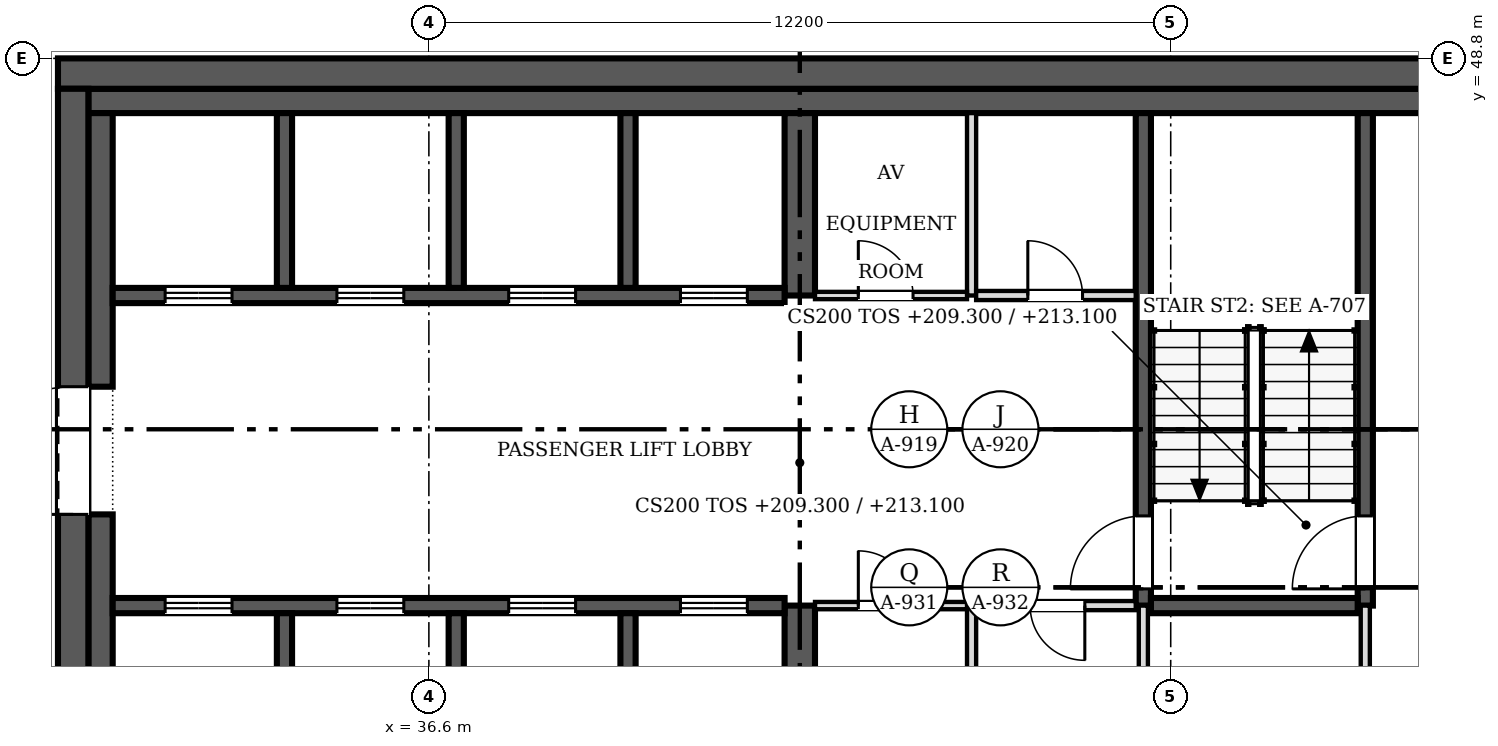
"""IFC4 building model, lengths in metres.
Left out: names, types, materials, properties, quantities, classifications, styles, units other than length and angle.
Written with IfcOpenShell. Run it as: python <this file> out.ifc"""

import sys

from ifc_helpers import new_model, si_unit, direction, frame, frame_2d, origin, place, context, subcontext, project, spatial, rectangle, extrude, source, transform, mapped, element, fill, save


model = new_model("IFC4")
c1 = context("Model", 3, precision=1e-05, world=origin(), true_north=direction((0.0, 1.0)))
c2 = subcontext(c1, "Body", "Model", "MODEL_VIEW")
j1 = project(units=[si_unit("LENGTHUNIT", "METRE"), si_unit("PLANEANGLEUNIT", "RADIAN")], contexts=[c1])
p1 = place(None, origin())
s1 = spatial("IfcSite", under=j1, at=p1, CompositionType="ELEMENT")
p2 = place(p1, origin())
s2 = spatial("IfcBuilding", under=s1, at=p2, CompositionType="ELEMENT")
p3 = place(p2, frame((0.0, 0.0, 209.3)))
s3 = spatial("IfcBuildingStorey", under=s2, at=p3, CompositionType="ELEMENT", Elevation=209.3)
p4 = place(p3, frame((30.75, 24.9, 0.0), z_axis=(0.0, 0.0, 1.0), x_axis=(0.0, 1.0, 0.0)))
e1 = element("IfcWall", 1, at=p4, inside=s3, PredefinedType="SHEAR", context=c2, shape_type="SweptSolid", body=[
    extrude(rectangle(XDim=23.4, YDim=0.5, at=frame_2d((11.7, 0.0))), origin(), (0.0, 0.0, 1.0), 3.8),
])
m1 = source(origin(), c2, "Body", "SweptSolid", [
    extrude(rectangle(XDim=2.1, YDim=2.4, at=frame_2d((1.05, 1.2))), frame((0.0, 0.26, 0.0), z_axis=(0.0, -1.0, 0.0), x_axis=(1.0, 0.0, 0.0)), (0.0, 0.0, 1.0), 0.52),
])
p5 = place(p4, frame((4.9, 0.0, 0.0)))
e2 = element("IfcOpeningElement", 2, at=p5, cuts=e1, PredefinedType="OPENING", context=c2, shape_type="MappedRepresentation", body=[
    mapped(m1, transform((0.0, 0.0, 0.0), scale=1.0)),
])
p6 = place(p4, frame((16.4, 0.0, 0.0)))
e3 = element("IfcOpeningElement", 3, at=p6, cuts=e1, PredefinedType="OPENING", context=c2, shape_type="MappedRepresentation", body=[
    mapped(m1, transform((0.0, 0.0, 0.0), scale=1.0)),
])
p7 = place(p3, frame((30.5, 48.55, 0.0), z_axis=(0.0, 0.0, 1.0), x_axis=(1.0, 0.0, 0.0)))
e4 = element("IfcWall", 4, at=p7, inside=s3, PredefinedType="SHEAR", context=c2, shape_type="SweptSolid", body=[
    extrude(rectangle(XDim=24.4, YDim=0.5, at=frame_2d((12.2, 0.0))), origin(), (0.0, 0.0, 1.0), 3.8),
])
p8 = place(p3, frame((31.0, 48.1, 0.0), z_axis=(0.0, 0.0, 1.0), x_axis=(1.0, 0.0, 0.0)))
e5 = element("IfcWall", 5, at=p8, inside=s3, PredefinedType="SOLIDWALL", context=c2, shape_type="SweptSolid", body=[
    extrude(rectangle(XDim=23.4, YDim=0.4, at=frame_2d((11.7, 0.0))), origin(), (0.0, 0.0, 1.0), 3.8),
])
p9 = place(p3, frame((31.2, 31.9, 0.0), z_axis=(0.0, 0.0, 1.0), x_axis=(0.0, 1.0, 0.0)))
e6 = element("IfcWall", 6, at=p9, inside=s3, PredefinedType="SOLIDWALL", context=c2, shape_type="SweptSolid", body=[
    extrude(rectangle(XDim=9.4, YDim=0.4, at=frame_2d((4.7, 0.0))), origin(), (0.0, 0.0, 1.0), 3.8),
])
p10 = place(p3, frame((31.2, 43.4, 0.0), z_axis=(0.0, 0.0, 1.0), x_axis=(0.0, 1.0, 0.0)))
e7 = element("IfcWall", 7, at=p10, inside=s3, PredefinedType="SOLIDWALL", context=c2, shape_type="SweptSolid", body=[
    extrude(rectangle(XDim=4.5, YDim=0.4, at=frame_2d((2.25, 0.0))), origin(), (0.0, 0.0, 1.0), 3.8),
])
p11 = place(p3, frame((42.7, 36.85, 0.0), z_axis=(0.0, 0.0, 1.0), x_axis=(0.0, 1.0, 0.0)))
e8 = element("IfcWall", 8, at=p11, inside=s3, PredefinedType="SHEAR", context=c2, shape_type="SweptSolid", body=[
    extrude(rectangle(XDim=2.95, YDim=0.5, at=frame_2d((1.475, 0.0))), origin(), (0.0, 0.0, 1.0), 3.8),
])
p12 = place(p3, frame((42.7, 44.9, 0.0), z_axis=(0.0, 0.0, 1.0), x_axis=(0.0, 1.0, 0.0)))
e9 = element("IfcWall", 9, at=p12, inside=s3, PredefinedType="SHEAR", context=c2, shape_type="SweptSolid", body=[
    extrude(rectangle(XDim=3.0, YDim=0.5, at=frame_2d((1.5, 0.0))), origin(), (0.0, 0.0, 1.0), 3.8),
])
p13 = place(p3, frame((31.4, 39.8, 0.0), z_axis=(0.0, 0.0, 1.0), x_axis=(1.0, 0.0, 0.0)))
e10 = element("IfcWall", 10, at=p13, inside=s3, PredefinedType="SOLIDWALL", context=c2, shape_type="SweptSolid", body=[
    extrude(rectangle(XDim=11.05, YDim=0.25, at=frame_2d((5.525, 0.0))), origin(), (0.0, 0.0, 1.0), 3.8),
])
m2 = source(origin(), c2, "Body", "SweptSolid", [
    extrude(rectangle(XDim=1.1, YDim=2.1, at=frame_2d((0.55, 1.05))), frame((0.0, 0.135, 0.0), z_axis=(0.0, -1.0, 0.0), x_axis=(1.0, 0.0, 0.0)), (0.0, 0.0, 1.0), 0.27),
])
p14 = place(p13, frame((0.863, 0.0, 0.0)))
e11 = element("IfcOpeningElement", 11, at=p14, cuts=e10, PredefinedType="OPENING", context=c2, shape_type="MappedRepresentation", body=[
    mapped(m2, transform((0.0, 0.0, 0.0), scale=1.0)),
])
p15 = place(p13, frame((3.688, 0.0, 0.0)))
e12 = element("IfcOpeningElement", 12, at=p15, cuts=e10, PredefinedType="OPENING", context=c2, shape_type="MappedRepresentation", body=[
    mapped(m2, transform((0.0, 0.0, 0.0), scale=1.0)),
])
p16 = place(p13, frame((6.512, 0.0, 0.0)))
e13 = element("IfcOpeningElement", 13, at=p16, cuts=e10, PredefinedType="OPENING", context=c2, shape_type="MappedRepresentation", body=[
    mapped(m2, transform((0.0, 0.0, 0.0), scale=1.0)),
])
p17 = place(p13, frame((9.337, 0.0, 0.0)))
e14 = element("IfcOpeningElement", 14, at=p17, cuts=e10, PredefinedType="OPENING", context=c2, shape_type="MappedRepresentation", body=[
    mapped(m2, transform((0.0, 0.0, 0.0), scale=1.0)),
])
p18 = place(p3, frame((42.45, 44.9, 0.0), z_axis=(0.0, 0.0, 1.0), x_axis=(-1.0, 0.0, 0.0)))
e15 = element("IfcWall", 15, at=p18, inside=s3, PredefinedType="SOLIDWALL", context=c2, shape_type="SweptSolid", body=[
    extrude(rectangle(XDim=11.05, YDim=0.25, at=frame_2d((5.525, 0.0))), origin(), (0.0, 0.0, 1.0), 3.8),
])
p19 = place(p18, frame((9.087, 0.0, 0.0)))
e16 = element("IfcOpeningElement", 16, at=p19, cuts=e15, PredefinedType="OPENING", context=c2, shape_type="MappedRepresentation", body=[
    mapped(m2, transform((0.0, 0.0, 0.0), scale=1.0)),
])
p20 = place(p18, frame((6.262, 0.0, 0.0)))
e17 = element("IfcOpeningElement", 17, at=p20, cuts=e15, PredefinedType="OPENING", context=c2, shape_type="MappedRepresentation", body=[
    mapped(m2, transform((0.0, 0.0, 0.0), scale=1.0)),
])
p21 = place(p18, frame((3.438, 0.0, 0.0)))
e18 = element("IfcOpeningElement", 18, at=p21, cuts=e15, PredefinedType="OPENING", context=c2, shape_type="MappedRepresentation", body=[
    mapped(m2, transform((0.0, 0.0, 0.0), scale=1.0)),
])
p22 = place(p18, frame((0.613, 0.0, 0.0)))
e19 = element("IfcOpeningElement", 19, at=p22, cuts=e15, PredefinedType="OPENING", context=c2, shape_type="MappedRepresentation", body=[
    mapped(m2, transform((0.0, 0.0, 0.0), scale=1.0)),
])
p23 = place(p3, frame((48.35, 47.9, 0.0), z_axis=(0.0, 0.0, 1.0), x_axis=(0.0, -1.0, 0.0)))
e20 = element("IfcWall", 20, at=p23, inside=s3, PredefinedType="SOLIDWALL", context=c2, shape_type="SweptSolid", body=[
    extrude(rectangle(XDim=8.1, YDim=0.25, at=frame_2d((4.05, 0.0))), origin(), (0.0, 0.0, 1.0), 3.8),
])
m3 = source(origin(), c2, "Body", "SweptSolid", [
    extrude(rectangle(XDim=1.2, YDim=2.1, at=frame_2d((0.6, 1.05))), frame((0.0, 0.135, 0.0), z_axis=(0.0, -1.0, 0.0), x_axis=(1.0, 0.0, 0.0)), (0.0, 0.0, 1.0), 0.27),
])
p24 = place(p23, frame((6.625, 0.0, 0.0)))
e21 = element("IfcOpeningElement", 21, at=p24, cuts=e20, PredefinedType="OPENING", context=c2, shape_type="MappedRepresentation", body=[
    mapped(m3, transform((0.0, 0.0, 0.0), scale=1.0)),
])
p25 = place(p3, frame((52.0, 39.8, 0.0), z_axis=(0.0, 0.0, 1.0), x_axis=(0.0, 1.0, 0.0)))
e22 = element("IfcWall", 22, at=p25, inside=s3, PredefinedType="SOLIDWALL", context=c2, shape_type="SweptSolid", body=[
    extrude(rectangle(XDim=8.1, YDim=0.25, at=frame_2d((4.05, 0.0))), origin(), (0.0, 0.0, 1.0), 3.8),
])
p26 = place(p25, frame((0.275, 0.0, 0.0)))
e23 = element("IfcOpeningElement", 23, at=p26, cuts=e22, PredefinedType="OPENING", context=c2, shape_type="MappedRepresentation", body=[
    mapped(m3, transform((0.0, 0.0, 0.0), scale=1.0)),
])
p27 = place(p3, frame((48.475, 39.8, 0.0), z_axis=(0.0, 0.0, 1.0), x_axis=(1.0, 0.0, 0.0)))
e24 = element("IfcWall", 24, at=p27, inside=s3, PredefinedType="SOLIDWALL", context=c2, shape_type="SweptSolid", body=[
    extrude(rectangle(XDim=3.4, YDim=0.25, at=frame_2d((1.7, 0.0))), origin(), (0.0, 0.0, 1.0), 3.8),
])
for number, where, z_axis, x_axis in (
    (25, (34.225, 36.85, 0.0), (0.0, 0.0, 1.0), (0.0, 1.0, 0.0)),
    (26, (37.05, 36.85, 0.0), (0.0, 0.0, 1.0), (0.0, 1.0, 0.0)),
    (27, (39.875, 36.85, 0.0), (0.0, 0.0, 1.0), (0.0, 1.0, 0.0)),
):
    element("IfcWall", number, at=place(p3, frame(where, z_axis=z_axis, x_axis=x_axis)), inside=s3, PredefinedType="SOLIDWALL", context=c2, shape_type="SweptSolid", body=[
        extrude(rectangle(XDim=2.825, YDim=0.25, at=frame_2d((1.413, 0.0))), origin(), (0.0, 0.0, 1.0), 3.8),
    ])
for number, where, z_axis, x_axis in (
    (28, (34.225, 45.025, 0.0), (0.0, 0.0, 1.0), (0.0, 1.0, 0.0)),
    (29, (37.05, 45.025, 0.0), (0.0, 0.0, 1.0), (0.0, 1.0, 0.0)),
    (30, (39.875, 45.025, 0.0), (0.0, 0.0, 1.0), (0.0, 1.0, 0.0)),
):
    element("IfcWall", number, at=place(p3, frame(where, z_axis=z_axis, x_axis=x_axis)), inside=s3, PredefinedType="SOLIDWALL", context=c2, shape_type="SweptSolid", body=[
        extrude(rectangle(XDim=2.875, YDim=0.25, at=frame_2d((1.438, 0.0))), origin(), (0.0, 0.0, 1.0), 3.8),
    ])
p28 = place(p3, frame((52.0, 33.525, 0.0), z_axis=(0.0, 0.0, 1.0), x_axis=(0.0, 1.0, 0.0)))
e31 = element("IfcWall", 31, at=p28, inside=s3, PredefinedType="PARTITIONING", context=c2, shape_type="SweptSolid", body=[
    extrude(rectangle(XDim=6.275, YDim=0.15, at=frame_2d((3.138, 0.0))), origin(), (0.0, 0.0, 1.0), 3.6),
])
m4 = source(origin(), c2, "Body", "SweptSolid", [
    extrude(rectangle(XDim=0.9, YDim=2.1, at=frame_2d((0.45, 1.05))), frame((0.0, 0.085, 0.0), z_axis=(0.0, -1.0, 0.0), x_axis=(1.0, 0.0, 0.0)), (0.0, 0.0, 1.0), 0.17),
])
p29 = place(p28, frame((1.025, 0.0, 0.0)))
e32 = element("IfcOpeningElement", 32, at=p29, cuts=e31, PredefinedType="OPENING", context=c2, shape_type="MappedRepresentation", body=[
    mapped(m4, transform((0.0, 0.0, 0.0), scale=1.0)),
])
for number, where, z_axis, x_axis in (
    (33, (45.525, 36.85, 0.0), (0.0, 0.0, 1.0), (0.0, 1.0, 0.0)),
    (34, (48.35, 36.85, 0.0), (0.0, 0.0, 1.0), (0.0, 1.0, 0.0)),
):
    element("IfcWall", number, at=place(p3, frame(where, z_axis=z_axis, x_axis=x_axis)), inside=s3, PredefinedType="PARTITIONING", context=c2, shape_type="SweptSolid", body=[
        extrude(rectangle(XDim=2.95, YDim=0.15, at=frame_2d((1.475, 0.0))), origin(), (0.0, 0.0, 1.0), 3.6),
    ])
p30 = place(p3, frame((45.525, 44.9, 0.0), z_axis=(0.0, 0.0, 1.0), x_axis=(0.0, 1.0, 0.0)))
e35 = element("IfcWall", 35, at=p30, inside=s3, PredefinedType="PARTITIONING", context=c2, shape_type="SweptSolid", body=[
    extrude(rectangle(XDim=3.0, YDim=0.15, at=frame_2d((1.5, 0.0))), origin(), (0.0, 0.0, 1.0), 3.6),
])
p31 = place(p3, frame((45.45, 39.8, 0.0), z_axis=(0.0, 0.0, 1.0), x_axis=(-1.0, 0.0, 0.0)))
e36 = element("IfcWall", 36, at=p31, inside=s3, PredefinedType="PARTITIONING", context=c2, shape_type="SweptSolid", body=[
    extrude(rectangle(XDim=2.5, YDim=0.12, at=frame_2d((1.25, 0.0))), origin(), (0.0, 0.0, 1.0), 3.6),
])
m5 = source(origin(), c2, "Body", "SweptSolid", [
    extrude(rectangle(XDim=0.9, YDim=2.1, at=frame_2d((0.45, 1.05))), frame((0.0, 0.07, 0.0), z_axis=(0.0, -1.0, 0.0), x_axis=(1.0, 0.0, 0.0)), (0.0, 0.0, 1.0), 0.14),
])
p32 = place(p31, frame((0.887, 0.0, 0.0)))
e37 = element("IfcOpeningElement", 37, at=p32, cuts=e36, PredefinedType="OPENING", context=c2, shape_type="MappedRepresentation", body=[
    mapped(m5, transform((0.0, 0.0, 0.0), scale=1.0)),
])
p33 = place(p3, frame((48.225, 39.8, 0.0), z_axis=(0.0, 0.0, 1.0), x_axis=(-1.0, 0.0, 0.0)))
e38 = element("IfcWall", 38, at=p33, inside=s3, PredefinedType="PARTITIONING", context=c2, shape_type="SweptSolid", body=[
    extrude(rectangle(XDim=2.625, YDim=0.15, at=frame_2d((1.312, 0.0))), origin(), (0.0, 0.0, 1.0), 3.6),
])
p34 = place(p33, frame((0.837, 0.0, 0.0)))
e39 = element("IfcOpeningElement", 39, at=p34, cuts=e38, PredefinedType="OPENING", context=c2, shape_type="MappedRepresentation", body=[
    mapped(m4, transform((0.0, 0.0, 0.0), scale=1.0)),
])
p35 = place(p3, frame((42.95, 44.9, 0.0), z_axis=(0.0, 0.0, 1.0), x_axis=(1.0, 0.0, 0.0)))
e40 = element("IfcWall", 40, at=p35, inside=s3, PredefinedType="PARTITIONING", context=c2, shape_type="SweptSolid", body=[
    extrude(rectangle(XDim=2.5, YDim=0.12, at=frame_2d((1.25, 0.0))), origin(), (0.0, 0.0, 1.0), 3.6),
])
p36 = place(p35, frame((0.712, 0.0, 0.0)))
e41 = element("IfcOpeningElement", 41, at=p36, cuts=e40, PredefinedType="OPENING", context=c2, shape_type="MappedRepresentation", body=[
    mapped(m5, transform((0.0, 0.0, 0.0), scale=1.0)),
])
p37 = place(p3, frame((45.6, 44.9, 0.0), z_axis=(0.0, 0.0, 1.0), x_axis=(1.0, 0.0, 0.0)))
e42 = element("IfcWall", 42, at=p37, inside=s3, PredefinedType="PARTITIONING", context=c2, shape_type="SweptSolid", body=[
    extrude(rectangle(XDim=2.625, YDim=0.15, at=frame_2d((1.312, 0.0))), origin(), (0.0, 0.0, 1.0), 3.6),
])
p38 = place(p37, frame((0.85, 0.0, 0.0)))
e43 = element("IfcOpeningElement", 43, at=p38, cuts=e42, PredefinedType="OPENING", context=c2, shape_type="MappedRepresentation", body=[
    mapped(m4, transform((0.0, 0.0, 0.0), scale=1.0)),
])
m6 = source(origin(), c2, "Body", "SweptSolid", [
    extrude(rectangle(XDim=2.1, YDim=2.4, at=frame_2d((1.05, 1.2))), frame((0.0, 0.025, 0.0), z_axis=(0.0, -1.0, 0.0), x_axis=(1.0, 0.0, 0.0)), (0.0, 0.0, 1.0), 0.05),
])
p39 = place(p6, origin())
e44 = element("IfcDoor", 44, at=p39, inside=s3, OperationType="DOUBLE_DOOR_SINGLE_SWING", PredefinedType="DOOR", context=c2, shape_type="MappedRepresentation", body=[
    mapped(m6, transform((0.0, 0.0, 0.0), scale=1.0)),
])
fill(e3, e44)
m7 = source(origin(), c2, "Body", "SweptSolid", [
    extrude(rectangle(XDim=1.1, YDim=2.1, at=frame_2d((0.55, 1.05))), frame((0.0, 0.025, 0.0), z_axis=(0.0, -1.0, 0.0), x_axis=(1.0, 0.0, 0.0)), (0.0, 0.0, 1.0), 0.05),
])
p40 = place(p14, origin())
e45 = element("IfcDoor", 45, at=p40, inside=s3, OperationType="DOUBLE_DOOR_SLIDING", PredefinedType="DOOR", context=c2, shape_type="MappedRepresentation", body=[
    mapped(m7, transform((0.0, 0.0, 0.0), scale=1.0)),
])
fill(e11, e45)
p41 = place(p15, origin())
e46 = element("IfcDoor", 46, at=p41, inside=s3, OperationType="DOUBLE_DOOR_SLIDING", PredefinedType="DOOR", context=c2, shape_type="MappedRepresentation", body=[
    mapped(m7, transform((0.0, 0.0, 0.0), scale=1.0)),
])
fill(e12, e46)
p42 = place(p16, origin())
e47 = element("IfcDoor", 47, at=p42, inside=s3, OperationType="DOUBLE_DOOR_SLIDING", PredefinedType="DOOR", context=c2, shape_type="MappedRepresentation", body=[
    mapped(m7, transform((0.0, 0.0, 0.0), scale=1.0)),
])
fill(e13, e47)
p43 = place(p17, origin())
e48 = element("IfcDoor", 48, at=p43, inside=s3, OperationType="DOUBLE_DOOR_SLIDING", PredefinedType="DOOR", context=c2, shape_type="MappedRepresentation", body=[
    mapped(m7, transform((0.0, 0.0, 0.0), scale=1.0)),
])
fill(e14, e48)
p44 = place(p19, origin())
e49 = element("IfcDoor", 49, at=p44, inside=s3, OperationType="DOUBLE_DOOR_SLIDING", PredefinedType="DOOR", context=c2, shape_type="MappedRepresentation", body=[
    mapped(m7, transform((0.0, 0.0, 0.0), scale=1.0)),
])
fill(e16, e49)
p45 = place(p20, origin())
e50 = element("IfcDoor", 50, at=p45, inside=s3, OperationType="DOUBLE_DOOR_SLIDING", PredefinedType="DOOR", context=c2, shape_type="MappedRepresentation", body=[
    mapped(m7, transform((0.0, 0.0, 0.0), scale=1.0)),
])
fill(e17, e50)
p46 = place(p21, origin())
e51 = element("IfcDoor", 51, at=p46, inside=s3, OperationType="DOUBLE_DOOR_SLIDING", PredefinedType="DOOR", context=c2, shape_type="MappedRepresentation", body=[
    mapped(m7, transform((0.0, 0.0, 0.0), scale=1.0)),
])
fill(e18, e51)
p47 = place(p22, origin())
e52 = element("IfcDoor", 52, at=p47, inside=s3, OperationType="DOUBLE_DOOR_SLIDING", PredefinedType="DOOR", context=c2, shape_type="MappedRepresentation", body=[
    mapped(m7, transform((0.0, 0.0, 0.0), scale=1.0)),
])
fill(e19, e52)
m8 = source(origin(), c2, "Body", "SweptSolid", [
    extrude(rectangle(XDim=1.2, YDim=2.1, at=frame_2d((0.6, 1.05))), frame((0.0, 0.025, 0.0), z_axis=(0.0, -1.0, 0.0), x_axis=(1.0, 0.0, 0.0)), (0.0, 0.0, 1.0), 0.05),
])
p48 = place(p24, origin())
e53 = element("IfcDoor", 53, at=p48, inside=s3, OperationType="SINGLE_SWING_RIGHT", PredefinedType="DOOR", context=c2, shape_type="MappedRepresentation", body=[
    mapped(m8, transform((0.0, 0.0, 0.0), scale=1.0)),
])
fill(e21, e53)
p49 = place(p26, origin())
e54 = element("IfcDoor", 54, at=p49, inside=s3, OperationType="SINGLE_SWING_LEFT", PredefinedType="DOOR", context=c2, shape_type="MappedRepresentation", body=[
    mapped(m8, transform((0.0, 0.0, 0.0), scale=1.0)),
])
fill(e23, e54)
m9 = source(origin(), c2, "Body", "SweptSolid", [
    extrude(rectangle(XDim=0.9, YDim=2.1, at=frame_2d((0.45, 1.05))), frame((0.0, 0.025, 0.0), z_axis=(0.0, -1.0, 0.0), x_axis=(1.0, 0.0, 0.0)), (0.0, 0.0, 1.0), 0.05),
])
p50 = place(p32, origin())
e55 = element("IfcDoor", 55, at=p50, inside=s3, OperationType="SINGLE_SWING_RIGHT", PredefinedType="DOOR", context=c2, shape_type="MappedRepresentation", body=[
    mapped(m9, transform((0.0, 0.0, 0.0), scale=1.0)),
])
fill(e37, e55)
p51 = place(p34, origin())
e56 = element("IfcDoor", 56, at=p51, inside=s3, OperationType="SINGLE_SWING_LEFT", PredefinedType="DOOR", context=c2, shape_type="MappedRepresentation", body=[
    mapped(m9, transform((0.0, 0.0, 0.0), scale=1.0)),
])
fill(e39, e56)
p52 = place(p36, origin())
e57 = element("IfcDoor", 57, at=p52, inside=s3, OperationType="SINGLE_SWING_LEFT", PredefinedType="DOOR", context=c2, shape_type="MappedRepresentation", body=[
    mapped(m9, transform((0.0, 0.0, 0.0), scale=1.0)),
])
fill(e41, e57)
p53 = place(p38, origin())
e58 = element("IfcDoor", 58, at=p53, inside=s3, OperationType="SINGLE_SWING_LEFT", PredefinedType="DOOR", context=c2, shape_type="MappedRepresentation", body=[
    mapped(m9, transform((0.0, 0.0, 0.0), scale=1.0)),
])
fill(e43, e58)
save(model, sys.argv[1])
